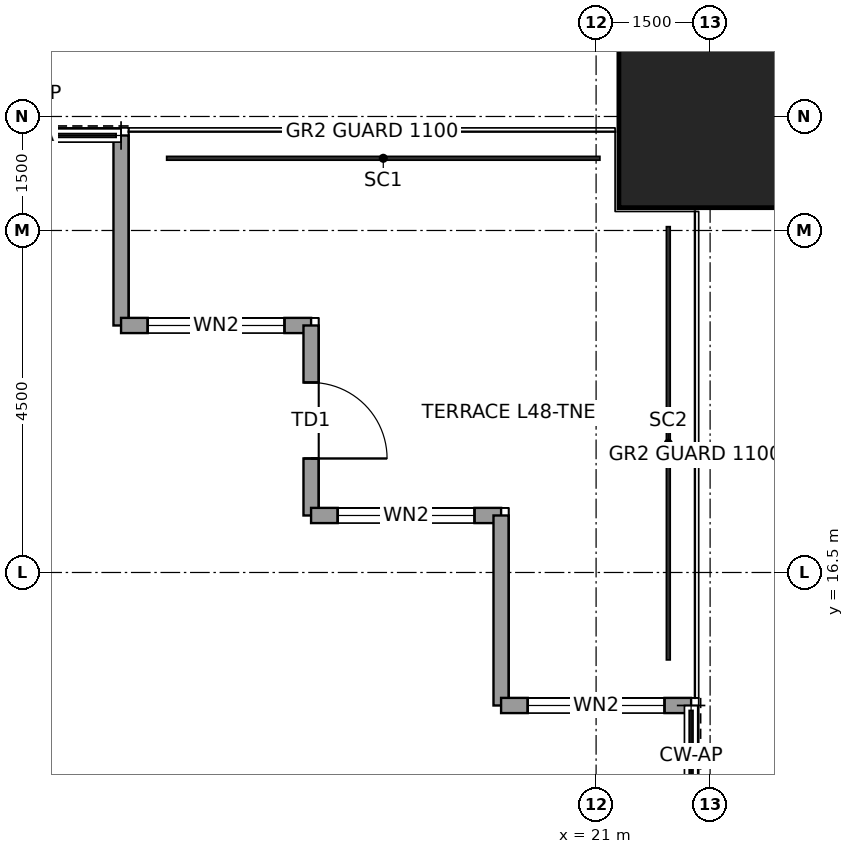
"""IFC4 building model, lengths in metres.
Left out: names, types, materials, properties, quantities, classifications, styles, units other than length and angle.
Written with IfcOpenShell. Run it as: python <this file> out.ifc"""

import sys

from ifc_helpers import new_model, si_unit, direction, frame, frame_2d, origin, origin_2d, place, context, subcontext, project, spatial, rectangle, hollow_rectangle, extrude, element, fill, save


model = new_model("IFC4")
c1 = context("Model", 3, precision=1e-05, world=origin(), true_north=direction((0.0, 1.0)))
c2 = subcontext(c1, "Body", "Model", "MODEL_VIEW")
j1 = project(units=[si_unit("LENGTHUNIT", "METRE"), si_unit("PLANEANGLEUNIT", "RADIAN")], contexts=[c1])
p1 = place(None, origin())
s1 = spatial("IfcSite", under=j1, at=p1, CompositionType="ELEMENT")
p2 = place(p1, origin())
s2 = spatial("IfcBuilding", under=s1, at=p2, CompositionType="ELEMENT")
p3 = place(p2, frame((0.0, 0.0, 225.9)))
s3 = spatial("IfcBuildingStorey", under=s2, at=p3, CompositionType="ELEMENT", Elevation=225.9)
p4 = place(p3, frame((22.5, 22.5, 0.0), z_axis=(0.0, 0.0, 1.0), x_axis=(1.0, 0.0, 0.0)))
e1 = element("IfcColumn", 1, at=p4, inside=s3, PredefinedType="COLUMN", context=c2, shape_type="SweptSolid", body=[
    extrude(hollow_rectangle(XDim=2.4, YDim=2.4, WallThickness=0.12, at=origin_2d()), origin(), (0.0, 0.0, 1.0), 4.0),
])
p5 = place(p3, frame((14.75, 22.25, 0.0), z_axis=(0.0, 0.0, 1.0), x_axis=(0.0, -1.0, 0.0)))
e2 = element("IfcWall", 2, at=p5, inside=s3, PredefinedType="SOLIDWALL", context=c2, shape_type="SweptSolid", body=[
    extrude(rectangle(XDim=2.5, YDim=0.2, at=frame_2d((1.25, 0.0))), origin(), (0.0, 0.0, 1.0), 3.85),
])
p6 = place(p3, frame((14.75, 19.75, 0.0), z_axis=(0.0, 0.0, 1.0), x_axis=(1.0, 0.0, 0.0)))
e3 = element("IfcWall", 3, at=p6, inside=s3, PredefinedType="SOLIDWALL", context=c2, shape_type="SweptSolid", body=[
    extrude(rectangle(XDim=2.5, YDim=0.2, at=frame_2d((1.25, 0.0))), origin(), (0.0, 0.0, 1.0), 3.85),
])
p7 = place(p6, frame((0.35, 0.0, 0.3)))
e4 = element("IfcOpeningElement", 4, at=p7, cuts=e3, PredefinedType="OPENING", context=c2, shape_type="SweptSolid", body=[
    extrude(rectangle(XDim=1.8, YDim=2.4, at=frame_2d((0.9, 1.2))), frame((0.0, 0.11, 0.0), z_axis=(0.0, -1.0, 0.0), x_axis=(1.0, 0.0, 0.0)), (0.0, 0.0, 1.0), 0.22),
])
p8 = place(p3, frame((17.25, 19.75, 0.0), z_axis=(0.0, 0.0, 1.0), x_axis=(0.0, -1.0, 0.0)))
e5 = element("IfcWall", 5, at=p8, inside=s3, PredefinedType="SOLIDWALL", context=c2, shape_type="SweptSolid", body=[
    extrude(rectangle(XDim=2.5, YDim=0.2, at=frame_2d((1.25, 0.0))), origin(), (0.0, 0.0, 1.0), 3.85),
])
p9 = place(p8, frame((0.75, 0.0, 0.0)))
e6 = element("IfcOpeningElement", 6, at=p9, cuts=e5, PredefinedType="OPENING", context=c2, shape_type="SweptSolid", body=[
    extrude(rectangle(XDim=1.0, YDim=2.4, at=frame_2d((0.5, 1.2))), frame((0.0, 0.11, 0.0), z_axis=(0.0, -1.0, 0.0), x_axis=(1.0, 0.0, 0.0)), (0.0, 0.0, 1.0), 0.22),
])
p10 = place(p3, frame((17.25, 17.25, 0.0), z_axis=(0.0, 0.0, 1.0), x_axis=(1.0, 0.0, 0.0)))
e7 = element("IfcWall", 7, at=p10, inside=s3, PredefinedType="SOLIDWALL", context=c2, shape_type="SweptSolid", body=[
    extrude(rectangle(XDim=2.5, YDim=0.2, at=frame_2d((1.25, 0.0))), origin(), (0.0, 0.0, 1.0), 3.85),
])
p11 = place(p10, frame((0.35, 0.0, 0.3)))
e8 = element("IfcOpeningElement", 8, at=p11, cuts=e7, PredefinedType="OPENING", context=c2, shape_type="SweptSolid", body=[
    extrude(rectangle(XDim=1.8, YDim=2.4, at=frame_2d((0.9, 1.2))), frame((0.0, 0.11, 0.0), z_axis=(0.0, -1.0, 0.0), x_axis=(1.0, 0.0, 0.0)), (0.0, 0.0, 1.0), 0.22),
])
p12 = place(p3, frame((19.75, 17.25, 0.0), z_axis=(0.0, 0.0, 1.0), x_axis=(0.0, -1.0, 0.0)))
e9 = element("IfcWall", 9, at=p12, inside=s3, PredefinedType="SOLIDWALL", context=c2, shape_type="SweptSolid", body=[
    extrude(rectangle(XDim=2.5, YDim=0.2, at=frame_2d((1.25, 0.0))), origin(), (0.0, 0.0, 1.0), 3.85),
])
p13 = place(p3, frame((19.75, 14.75, 0.0), z_axis=(0.0, 0.0, 1.0), x_axis=(1.0, 0.0, 0.0)))
e10 = element("IfcWall", 10, at=p13, inside=s3, PredefinedType="SOLIDWALL", context=c2, shape_type="SweptSolid", body=[
    extrude(rectangle(XDim=2.5, YDim=0.2, at=frame_2d((1.25, 0.0))), origin(), (0.0, 0.0, 1.0), 3.85),
])
p14 = place(p13, frame((0.35, 0.0, 0.3)))
e11 = element("IfcOpeningElement", 11, at=p14, cuts=e10, PredefinedType="OPENING", context=c2, shape_type="SweptSolid", body=[
    extrude(rectangle(XDim=1.8, YDim=2.4, at=frame_2d((0.9, 1.2))), frame((0.0, 0.11, 0.0), z_axis=(0.0, -1.0, 0.0), x_axis=(1.0, 0.0, 0.0)), (0.0, 0.0, 1.0), 0.22),
])
p15 = place(p7, origin())
e12 = element("IfcWindow", 12, at=p15, inside=s3, PartitioningType="SINGLE_PANEL", PredefinedType="WINDOW", context=c2, shape_type="SweptSolid", body=[
    extrude(rectangle(XDim=1.8, YDim=2.4, at=frame_2d((0.9, 1.2))), frame((0.0, 0.03, 0.0), z_axis=(0.0, -1.0, 0.0), x_axis=(1.0, 0.0, 0.0)), (0.0, 0.0, 1.0), 0.06),
])
fill(e4, e12)
p16 = place(p9, origin())
e13 = element("IfcDoor", 13, at=p16, inside=s3, OperationType="SINGLE_SWING_RIGHT", PredefinedType="DOOR", context=c2, shape_type="SweptSolid", body=[
    extrude(rectangle(XDim=1.0, YDim=2.4, at=frame_2d((0.5, 1.2))), frame((0.0, 0.025, 0.0), z_axis=(0.0, -1.0, 0.0), x_axis=(1.0, 0.0, 0.0)), (0.0, 0.0, 1.0), 0.05),
])
fill(e6, e13)
p17 = place(p11, origin())
e14 = element("IfcWindow", 14, at=p17, inside=s3, PartitioningType="SINGLE_PANEL", PredefinedType="WINDOW", context=c2, shape_type="SweptSolid", body=[
    extrude(rectangle(XDim=1.8, YDim=2.4, at=frame_2d((0.9, 1.2))), frame((0.0, 0.03, 0.0), z_axis=(0.0, -1.0, 0.0), x_axis=(1.0, 0.0, 0.0)), (0.0, 0.0, 1.0), 0.06),
])
fill(e8, e14)
p18 = place(p14, origin())
e15 = element("IfcWindow", 15, at=p18, inside=s3, PartitioningType="SINGLE_PANEL", PredefinedType="WINDOW", context=c2, shape_type="SweptSolid", body=[
    extrude(rectangle(XDim=1.8, YDim=2.4, at=frame_2d((0.9, 1.2))), frame((0.0, 0.03, 0.0), z_axis=(0.0, -1.0, 0.0), x_axis=(1.0, 0.0, 0.0)), (0.0, 0.0, 1.0), 0.06),
])
fill(e11, e15)
save(model, sys.argv[1])
